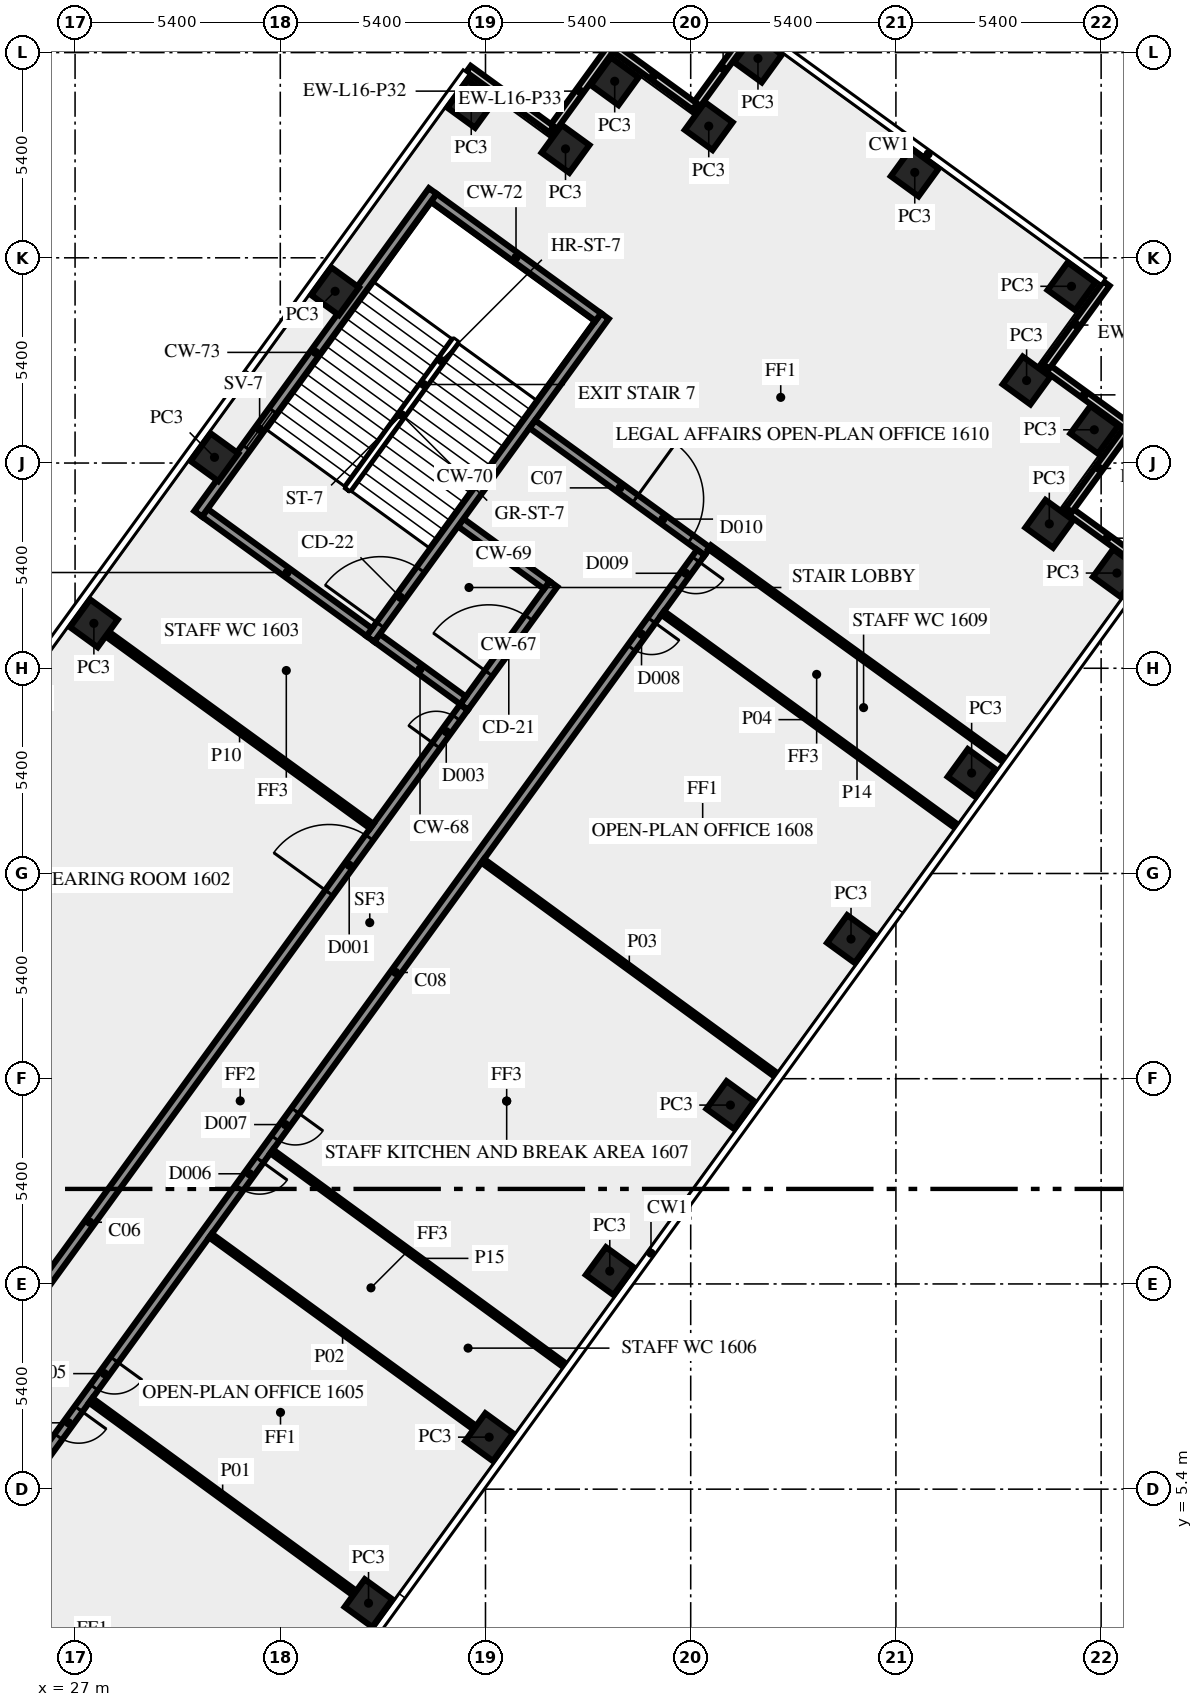
"""IFC4 building model, lengths in metres.
Left out: names, types, materials, properties, quantities, classifications, styles, units other than length and angle.
Written with IfcOpenShell. Run it as: python <this file> out.ifc"""

import sys

from ifc_helpers import new_model, si_unit, direction, frame, frame_2d, origin, origin_2d, place, context, subcontext, project, spatial, rectangle, extrude, element, fill, save


model = new_model("IFC4")
c1 = context("Model", 3, precision=1e-05, world=origin(), true_north=direction((0.0, 1.0)))
c2 = subcontext(c1, "Body", "Model", "MODEL_VIEW")
j1 = project(units=[si_unit("LENGTHUNIT", "METRE"), si_unit("PLANEANGLEUNIT", "RADIAN")], contexts=[c1])
p1 = place(None, origin())
s1 = spatial("IfcSite", under=j1, at=p1, CompositionType="ELEMENT")
p2 = place(p1, origin())
s2 = spatial("IfcBuilding", under=s1, at=p2, CompositionType="ELEMENT")
p3 = place(p2, frame((0.0, 0.0, 71.0)))
s3 = spatial("IfcBuildingStorey", under=s2, at=p3, CompositionType="ELEMENT", Elevation=71.0)
for number, where, z_axis, x_axis in (
    (1, (34.722, 2.4, 0.0), (0.0, 0.0, 1.0), (0.588, 0.809, 0.0)),
    (2, (37.896, 6.769, 0.0), (0.0, 0.0, 1.0), (0.588, 0.809, 0.0)),
    (3, (41.07, 11.137, 0.0), (0.0, 0.0, 1.0), (0.588, 0.809, 0.0)),
    (4, (44.244, 15.506, 0.0), (0.0, 0.0, 1.0), (0.588, 0.809, 0.0)),
    (5, (47.418, 19.875, 0.0), (0.0, 0.0, 1.0), (0.588, 0.809, 0.0)),
    (6, (50.592, 24.243, 0.0), (0.0, 0.0, 1.0), (0.588, 0.809, 0.0)),
    (7, (54.415, 29.505, 0.0), (0.0, 0.0, 1.0), (0.588, 0.809, 0.0)),
    (8, (52.636, 30.8, 0.0), (0.0, 0.0, 1.0), (-0.809, 0.588, 0.0)),
    (9, (53.82, 33.275, 0.0), (0.0, 0.0, 1.0), (-0.809, 0.588, 0.0)),
    (10, (52.039, 34.571, 0.0), (0.0, 0.0, 1.0), (0.588, 0.809, 0.0)),
    (11, (53.22, 37.05, 0.0), (0.0, 0.0, 1.0), (-0.809, 0.588, 0.0)),
    (12, (49.096, 40.047, 0.0), (0.0, 0.0, 1.0), (-0.809, 0.588, 0.0)),
    (13, (44.97, 43.045, 0.0), (0.0, 0.0, 1.0), (-0.809, 0.588, 0.0)),
    (14, (43.675, 41.265, 0.0), (0.0, 0.0, 1.0), (-0.809, 0.588, 0.0)),
    (15, (41.2, 42.445, 0.0), (0.0, 0.0, 1.0), (-0.588, -0.809, 0.0)),
    (16, (39.906, 40.666, 0.0), (0.0, 0.0, 1.0), (-0.588, -0.809, 0.0)),
    (17, (37.425, 41.85, 0.0), (0.0, 0.0, 1.0), (-0.588, -0.809, 0.0)),
    (18, (33.843, 36.919, 0.0), (0.0, 0.0, 1.0), (-0.588, -0.809, 0.0)),
    (19, (30.669, 32.55, 0.0), (0.0, 0.0, 1.0), (-0.588, -0.809, 0.0)),
    (20, (27.495, 28.181, 0.0), (0.0, 0.0, 1.0), (-0.588, -0.809, 0.0)),
):
    element("IfcColumn", number, at=place(p3, frame(where, z_axis=z_axis, x_axis=x_axis)), inside=s3, PredefinedType="COLUMN", context=c2, shape_type="SweptSolid", body=[
        extrude(rectangle(XDim=0.9, YDim=0.9, at=origin_2d()), origin(), (0.0, 0.0, 1.0), 3.65),
    ])
p4 = place(p3, frame((55.247, 29.629, 0.0), z_axis=(0.0, 0.0, 1.0), x_axis=(-0.809033161865, 0.587762999008, 0.0)))
e21 = element("IfcWall", 21, at=p4, inside=s3, PredefinedType="SOLIDWALL", context=c2, shape_type="SweptSolid", body=[
    extrude(rectangle(XDim=2.7, YDim=0.2, at=frame_2d((1.35, 0.0))), origin(), (0.0, 0.0, 1.0), 3.65),
])
p5 = place(p3, frame((53.151, 31.167, 0.0), z_axis=(0.0, 0.0, 1.0), x_axis=(0.587779184282, 0.809021403008, 0.0)))
e22 = element("IfcWall", 22, at=p5, inside=s3, PredefinedType="SOLIDWALL", context=c2, shape_type="SweptSolid", body=[
    extrude(rectangle(XDim=2.7, YDim=0.2, at=frame_2d((1.35, 0.0))), origin(), (0.0, 0.0, 1.0), 3.65),
])
for number, where, z_axis, x_axis in (
    (23, (54.65, 33.4, 0.0), (0.0, 0.0, 1.0), (-0.809, 0.588, 0.0)),
    (24, (52.553, 34.938, 0.0), (0.0, 0.0, 1.0), (0.588, 0.809, 0.0)),
    (25, (44.846, 43.875, 0.0), (0.0, 0.0, 1.0), (-0.588, -0.809, 0.0)),
    (26, (43.308, 41.779, 0.0), (0.0, 0.0, 1.0), (-0.809, 0.588, 0.0)),
):
    element("IfcWall", number, at=place(p3, frame(where, z_axis=z_axis, x_axis=x_axis)), inside=s3, PredefinedType="SOLIDWALL", context=c2, shape_type="SweptSolid", body=[
        extrude(rectangle(XDim=2.7, YDim=0.2, at=frame_2d((1.35, 0.0))), origin(), (0.0, 0.0, 1.0), 3.65),
    ])
p6 = place(p3, frame((41.075, 43.278, 0.0), z_axis=(0.0, 0.0, 1.0), x_axis=(-0.587806000234, -0.809001919707, 0.0)))
e27 = element("IfcWall", 27, at=p6, inside=s3, PredefinedType="SOLIDWALL", context=c2, shape_type="SweptSolid", body=[
    extrude(rectangle(XDim=2.7, YDim=0.2, at=frame_2d((1.35, 0.0))), origin(), (0.0, 0.0, 1.0), 3.65),
])
p7 = place(p3, frame((39.537, 41.181, 0.0), z_axis=(0.0, 0.0, 1.0), x_axis=(-0.809033161865, 0.587762999008, 0.0)))
e28 = element("IfcWall", 28, at=p7, inside=s3, PredefinedType="SOLIDWALL", context=c2, shape_type="SweptSolid", body=[
    extrude(rectangle(XDim=2.7, YDim=0.2, at=frame_2d((1.35, 0.0))), origin(), (0.0, 0.0, 1.0), 3.65),
])
p8 = place(p3, frame((37.238, 25.98, 0.0), z_axis=(0.0, 0.0, 1.0), x_axis=(0.587772420479, 0.809026317077, 0.0)))
e29 = element("IfcWall", 29, at=p8, inside=s3, PredefinedType="SHEAR", context=c2, shape_type="SweptSolid", body=[
    extrude(rectangle(XDim=4.0, YDim=0.25, at=frame_2d((2.0, 0.0))), origin(), (0.0, 0.0, 1.0), 3.65),
])
p9 = place(p8, frame((1.1, 0.0, 0.0)))
e30 = element("IfcOpeningElement", 30, at=p9, cuts=e29, PredefinedType="OPENING", context=c2, shape_type="SweptSolid", body=[
    extrude(rectangle(XDim=1.8, YDim=2.1, at=frame_2d((0.9, 1.05))), frame((0.0, 0.135, 0.0), z_axis=(0.0, -1.0, 0.0), x_axis=(1.0, 0.0, 0.0)), (0.0, 0.0, 1.0), 0.27),
])
for number, where, z_axis, x_axis in (
    (31, (37.21, 26.154, 0.0), (0.0, 0.0, 1.0), (-0.809, 0.588, 0.0)),
    (32, (39.414, 29.188, 0.0), (0.0, 0.0, 1.0), (-0.809, 0.588, 0.0)),
):
    element("IfcWall", number, at=place(p3, frame(where, z_axis=z_axis, x_axis=x_axis)), inside=s3, PredefinedType="SHEAR", context=c2, shape_type="SweptSolid", body=[
        extrude(rectangle(XDim=2.8, YDim=0.25, at=frame_2d((1.4, 0.0))), origin(), (0.0, 0.0, 1.0), 3.65),
    ])
p10 = place(p3, frame((34.77, 27.772, 0.0), z_axis=(0.0, 0.0, 1.0), x_axis=(0.587795589702, 0.809009483706, 0.0)))
e33 = element("IfcWall", 33, at=p10, inside=s3, PredefinedType="SHEAR", context=c2, shape_type="SweptSolid", body=[
    extrude(rectangle(XDim=10.5, YDim=0.25, at=frame_2d((5.25, 0.0))), origin(), (0.0, 0.0, 1.0), 3.65),
])
p11 = place(p10, frame((0.45, 0.0, 0.0)))
e34 = element("IfcOpeningElement", 34, at=p11, cuts=e33, PredefinedType="OPENING", context=c2, shape_type="SweptSolid", body=[
    extrude(rectangle(XDim=1.8, YDim=2.1, at=frame_2d((0.9, 1.05))), frame((0.0, 0.135, 0.0), z_axis=(0.0, -1.0, 0.0), x_axis=(1.0, 0.0, 0.0)), (0.0, 0.0, 1.0), 0.27),
])
p12 = place(p3, frame((34.742, 27.947, 0.0), z_axis=(0.0, 0.0, 1.0), x_axis=(-0.8089984606, 0.587810760999, 0.0)))
e35 = element("IfcWall", 35, at=p12, inside=s3, PredefinedType="SHEAR", context=c2, shape_type="SweptSolid", body=[
    extrude(rectangle(XDim=5.35, YDim=0.25, at=frame_2d((2.675, 0.0))), origin(), (0.0, 0.0, 1.0), 3.65),
])
p13 = place(p3, frame((40.767, 36.24, 0.0), z_axis=(0.0, 0.0, 1.0), x_axis=(-0.809020161303, 0.587780893365, 0.0)))
e36 = element("IfcWall", 36, at=p13, inside=s3, PredefinedType="SHEAR", context=c2, shape_type="SweptSolid", body=[
    extrude(rectangle(XDim=5.35, YDim=0.25, at=frame_2d((2.675, 0.0))), origin(), (0.0, 0.0, 1.0), 3.65),
])
p14 = place(p3, frame((30.24, 31.064, 0.0), z_axis=(0.0, 0.0, 1.0), x_axis=(0.587795589702, 0.809009483706, 0.0)))
e37 = element("IfcWall", 37, at=p14, inside=s3, PredefinedType="SHEAR", context=c2, shape_type="SweptSolid", body=[
    extrude(rectangle(XDim=10.5, YDim=0.25, at=frame_2d((5.25, 0.0))), origin(), (0.0, 0.0, 1.0), 3.65),
])
p15 = place(p14, frame((2.15, 0.0, 1.0)))
e38 = element("IfcOpeningElement", 38, at=p15, cuts=e37, PredefinedType="OPENING", context=c2, shape_type="SweptSolid", body=[
    extrude(rectangle(XDim=1.2, YDim=1.2, at=frame_2d((0.6, 0.6))), frame((0.0, 0.135, 0.0), z_axis=(0.0, -1.0, 0.0), x_axis=(1.0, 0.0, 0.0)), (0.0, 0.0, 1.0), 0.27),
])
p16 = place(p3, frame((17.545, -1.125, 0.0), z_axis=(0.0, 0.0, 1.0), x_axis=(0.587786323093, 0.809016216391, 0.0)))
e39 = element("IfcWall", 39, at=p16, inside=s3, PredefinedType="SOLIDWALL", context=c2, shape_type="SweptSolid", body=[
    extrude(rectangle(XDim=33.493, YDim=0.25, at=frame_2d((16.747, 0.0))), origin(), (0.0, 0.0, 1.0), 3.65),
])
p17 = place(p16, frame((27.458, 0.0, 0.0)))
e40 = element("IfcOpeningElement", 40, at=p17, cuts=e39, PredefinedType="OPENING", context=c2, shape_type="SweptSolid", body=[
    extrude(rectangle(XDim=1.8, YDim=2.1, at=frame_2d((0.9, 1.05))), frame((0.0, 0.135, 0.0), z_axis=(0.0, -1.0, 0.0), x_axis=(1.0, 0.0, 0.0)), (0.0, 0.0, 1.0), 0.27),
])
p18 = place(p16, frame((3.392, 0.0, 0.0)))
e41 = element("IfcOpeningElement", 41, at=p18, cuts=e39, PredefinedType="OPENING", context=c2, shape_type="SweptSolid", body=[
    extrude(rectangle(XDim=1.8, YDim=2.1, at=frame_2d((0.9, 1.05))), frame((0.0, 0.135, 0.0), z_axis=(0.0, -1.0, 0.0), x_axis=(1.0, 0.0, 0.0)), (0.0, 0.0, 1.0), 0.27),
])
p19 = place(p16, frame((32.253, 0.0, 0.0)))
e42 = element("IfcOpeningElement", 42, at=p19, cuts=e39, PredefinedType="OPENING", context=c2, shape_type="SweptSolid", body=[
    extrude(rectangle(XDim=0.9, YDim=2.1, at=frame_2d((0.45, 1.05))), frame((0.0, 0.135, 0.0), z_axis=(0.0, -1.0, 0.0), x_axis=(1.0, 0.0, 0.0)), (0.0, 0.0, 1.0), 0.27),
])
p20 = place(p3, frame((39.034, 33.42, 0.0), z_axis=(0.0, 0.0, 1.0), x_axis=(0.809023325802, -0.587776537732, 0.0)))
e43 = element("IfcWall", 43, at=p20, inside=s3, PredefinedType="SOLIDWALL", context=c2, shape_type="SweptSolid", body=[
    extrude(rectangle(XDim=5.695, YDim=0.25, at=frame_2d((2.848, 0.0))), origin(), (0.0, 0.0, 1.0), 3.65),
])
p21 = place(p20, frame((3.345, 0.0, 0.0)))
e44 = element("IfcOpeningElement", 44, at=p21, cuts=e43, PredefinedType="OPENING", context=c2, shape_type="SweptSolid", body=[
    extrude(rectangle(XDim=1.8, YDim=2.1, at=frame_2d((0.9, 1.05))), frame((0.0, 0.135, 0.0), z_axis=(0.0, -1.0, 0.0), x_axis=(1.0, 0.0, 0.0)), (0.0, 0.0, 1.0), 0.27),
])
p22 = place(p3, frame((43.467, 30.045, 0.0), z_axis=(0.0, 0.0, 1.0), x_axis=(-0.587784726077, -0.809017376692, 0.0)))
e45 = element("IfcWall", 45, at=p22, inside=s3, PredefinedType="SOLIDWALL", context=c2, shape_type="SweptSolid", body=[
    extrude(rectangle(XDim=39.02, YDim=0.25, at=frame_2d((19.51, 0.0))), origin(), (0.0, 0.0, 1.0), 3.65),
])
p23 = place(p22, frame((26.254, 0.0, 0.0)))
e46 = element("IfcOpeningElement", 46, at=p23, cuts=e45, PredefinedType="OPENING", context=c2, shape_type="SweptSolid", body=[
    extrude(rectangle(XDim=0.9, YDim=2.1, at=frame_2d((0.45, 1.05))), frame((0.0, 0.135, 0.0), z_axis=(0.0, -1.0, 0.0), x_axis=(1.0, 0.0, 0.0)), (0.0, 0.0, 1.0), 0.27),
])
p24 = place(p22, frame((2.205, 0.0, 0.0)))
e47 = element("IfcOpeningElement", 47, at=p24, cuts=e45, PredefinedType="OPENING", context=c2, shape_type="SweptSolid", body=[
    extrude(rectangle(XDim=0.9, YDim=2.1, at=frame_2d((0.45, 1.05))), frame((0.0, 0.135, 0.0), z_axis=(0.0, -1.0, 0.0), x_axis=(1.0, 0.0, 0.0)), (0.0, 0.0, 1.0), 0.27),
])
p25 = place(p22, frame((27.855, 0.0, 0.0)))
e48 = element("IfcOpeningElement", 48, at=p25, cuts=e45, PredefinedType="OPENING", context=c2, shape_type="SweptSolid", body=[
    extrude(rectangle(XDim=0.9, YDim=2.1, at=frame_2d((0.45, 1.05))), frame((0.0, 0.135, 0.0), z_axis=(0.0, -1.0, 0.0), x_axis=(1.0, 0.0, 0.0)), (0.0, 0.0, 1.0), 0.27),
])
p26 = place(p22, frame((18.155, 0.0, 0.0)))
e49 = element("IfcOpeningElement", 49, at=p26, cuts=e45, PredefinedType="OPENING", context=c2, shape_type="SweptSolid", body=[
    extrude(rectangle(XDim=0.9, YDim=2.1, at=frame_2d((0.45, 1.05))), frame((0.0, 0.135, 0.0), z_axis=(0.0, -1.0, 0.0), x_axis=(1.0, 0.0, 0.0)), (0.0, 0.0, 1.0), 0.27),
])
p27 = place(p22, frame((19.755, 0.0, 0.0)))
e50 = element("IfcOpeningElement", 50, at=p27, cuts=e45, PredefinedType="OPENING", context=c2, shape_type="SweptSolid", body=[
    extrude(rectangle(XDim=0.9, YDim=2.1, at=frame_2d((0.45, 1.05))), frame((0.0, 0.135, 0.0), z_axis=(0.0, -1.0, 0.0), x_axis=(1.0, 0.0, 0.0)), (0.0, 0.0, 1.0), 0.27),
])
p28 = place(p22, frame((0.224, 0.0, 0.0)))
e51 = element("IfcOpeningElement", 51, at=p28, cuts=e45, PredefinedType="OPENING", context=c2, shape_type="SweptSolid", body=[
    extrude(rectangle(XDim=0.9, YDim=2.1, at=frame_2d((0.45, 1.05))), frame((0.0, 0.135, 0.0), z_axis=(0.0, -1.0, 0.0), x_axis=(1.0, 0.0, 0.0)), (0.0, 0.0, 1.0), 0.27),
])
p29 = place(p3, frame((27.413, 7.735, 0.0), z_axis=(0.0, 0.0, 1.0), x_axis=(0.807664804385, -0.589641894507, 0.0)))
e52 = element("IfcWall", 52, at=p29, inside=s3, PredefinedType="PARTITIONING", context=c2, shape_type="SweptSolid", body=[
    extrude(rectangle(XDim=8.594, YDim=0.15, at=frame_2d((4.297, 0.0))), origin(), (0.0, 0.0, 1.0), 3.65),
])
p30 = place(p3, frame((37.516, 7.02, 0.0), z_axis=(0.0, 0.0, 1.0), x_axis=(-0.809002556908, 0.587805123248, 0.0)))
e53 = element("IfcWall", 53, at=p30, inside=s3, PredefinedType="PARTITIONING", context=c2, shape_type="SweptSolid", body=[
    extrude(rectangle(XDim=8.595, YDim=0.12, at=frame_2d((4.297, 0.0))), origin(), (0.0, 0.0, 1.0), 3.65),
])
p31 = place(p3, frame((37.728, 21.934, 0.0), z_axis=(0.0, 0.0, 1.0), x_axis=(0.807645841498, -0.589667868135, 0.0)))
e54 = element("IfcWall", 54, at=p31, inside=s3, PredefinedType="PARTITIONING", context=c2, shape_type="SweptSolid", body=[
    extrude(rectangle(XDim=9.551, YDim=0.12, at=frame_2d((4.775, 0.0))), origin(), (0.0, 0.0, 1.0), 2.75),
])
p32 = place(p3, frame((50.192, 22.841, 0.0), z_axis=(0.0, 0.0, 1.0), x_axis=(-0.809033337127, 0.587762757767, 0.0)))
e55 = element("IfcWall", 55, at=p32, inside=s3, PredefinedType="PARTITIONING", context=c2, shape_type="SweptSolid", body=[
    extrude(rectangle(XDim=9.551, YDim=0.12, at=frame_2d((4.775, 0.0))), origin(), (0.0, 0.0, 1.0), 2.75),
])
p33 = place(p3, frame((34.806, 22.845, 0.0), z_axis=(0.0, 0.0, 1.0), x_axis=(-0.809030728677, 0.587766348183, 0.0)))
e56 = element("IfcWall", 56, at=p33, inside=s3, PredefinedType="PARTITIONING", context=c2, shape_type="SweptSolid", body=[
    extrude(rectangle(XDim=8.596, YDim=0.15, at=frame_2d((4.298, 0.0))), origin(), (0.0, 0.0, 1.0), 3.65),
])
p34 = place(p3, frame((43.698, 30.185, 0.0), z_axis=(0.0, 0.0, 1.0), x_axis=(0.810419489461, -0.58585002441, 0.0)))
e57 = element("IfcWall", 57, at=p34, inside=s3, PredefinedType="PARTITIONING", context=c2, shape_type="SweptSolid", body=[
    extrude(rectangle(XDim=9.57, YDim=0.12, at=frame_2d((4.785, 0.0))), origin(), (0.0, 0.0, 1.0), 2.75),
])
p35 = place(p3, frame((32.174, 14.288, 0.0), z_axis=(0.0, 0.0, 1.0), x_axis=(0.807664588563, -0.589642190131, 0.0)))
e58 = element("IfcWall", 58, at=p35, inside=s3, PredefinedType="PARTITIONING", context=c2, shape_type="SweptSolid", body=[
    extrude(rectangle(XDim=9.55, YDim=0.12, at=frame_2d((4.775, 0.0))), origin(), (0.0, 0.0, 1.0), 2.75),
])
p36 = place(p9, origin())
e59 = element("IfcDoor", 59, at=p36, inside=s3, OperationType="DOUBLE_DOOR_SINGLE_SWING", PredefinedType="DOOR", context=c2, shape_type="SweptSolid", body=[
    extrude(rectangle(XDim=1.8, YDim=2.1, at=frame_2d((0.9, 1.05))), frame((0.0, 0.025, 0.0), z_axis=(0.0, -1.0, 0.0), x_axis=(1.0, 0.0, 0.0)), (0.0, 0.0, 1.0), 0.05),
])
fill(e30, e59)
p37 = place(p11, origin())
e60 = element("IfcDoor", 60, at=p37, inside=s3, OperationType="DOUBLE_DOOR_SINGLE_SWING", PredefinedType="DOOR", context=c2, shape_type="SweptSolid", body=[
    extrude(rectangle(XDim=1.8, YDim=2.1, at=frame_2d((0.9, 1.05))), frame((0.0, 0.025, 0.0), z_axis=(0.0, -1.0, 0.0), x_axis=(1.0, 0.0, 0.0)), (0.0, 0.0, 1.0), 0.05),
])
fill(e34, e60)
p38 = place(p15, origin())
e61 = element("IfcWindow", 61, at=p38, inside=s3, PartitioningType="SINGLE_PANEL", PredefinedType="WINDOW", context=c2, shape_type="SweptSolid", body=[
    extrude(rectangle(XDim=1.2, YDim=1.2, at=frame_2d((0.6, 0.6))), frame((0.0, 0.03, 0.0), z_axis=(0.0, -1.0, 0.0), x_axis=(1.0, 0.0, 0.0)), (0.0, 0.0, 1.0), 0.06),
])
fill(e38, e61)
p39 = place(p23, origin())
e62 = element("IfcDoor", 62, at=p39, inside=s3, OperationType="SINGLE_SWING_RIGHT", PredefinedType="DOOR", context=c2, shape_type="SweptSolid", body=[
    extrude(rectangle(XDim=0.9, YDim=2.1, at=frame_2d((0.45, 1.05))), frame((0.0, 0.025, 0.0), z_axis=(0.0, -1.0, 0.0), x_axis=(1.0, 0.0, 0.0)), (0.0, 0.0, 1.0), 0.05),
])
fill(e46, e62)
p40 = place(p24, origin())
e63 = element("IfcDoor", 63, at=p40, inside=s3, OperationType="SINGLE_SWING_LEFT", PredefinedType="DOOR", context=c2, shape_type="SweptSolid", body=[
    extrude(rectangle(XDim=0.9, YDim=2.1, at=frame_2d((0.45, 1.05))), frame((0.0, 0.025, 0.0), z_axis=(0.0, -1.0, 0.0), x_axis=(1.0, 0.0, 0.0)), (0.0, 0.0, 1.0), 0.05),
])
fill(e47, e63)
p41 = place(p17, origin())
e64 = element("IfcDoor", 64, at=p41, inside=s3, OperationType="DOUBLE_DOOR_SINGLE_SWING", PredefinedType="DOOR", context=c2, shape_type="SweptSolid", body=[
    extrude(rectangle(XDim=1.8, YDim=2.1, at=frame_2d((0.9, 1.05))), frame((0.0, 0.025, 0.0), z_axis=(0.0, -1.0, 0.0), x_axis=(1.0, 0.0, 0.0)), (0.0, 0.0, 1.0), 0.05),
])
fill(e40, e64)
p42 = place(p25, origin())
e65 = element("IfcDoor", 65, at=p42, inside=s3, OperationType="SINGLE_SWING_LEFT", PredefinedType="DOOR", context=c2, shape_type="SweptSolid", body=[
    extrude(rectangle(XDim=0.9, YDim=2.1, at=frame_2d((0.45, 1.05))), frame((0.0, 0.025, 0.0), z_axis=(0.0, -1.0, 0.0), x_axis=(1.0, 0.0, 0.0)), (0.0, 0.0, 1.0), 0.05),
])
fill(e48, e65)
p43 = place(p21, origin())
e66 = element("IfcDoor", 66, at=p43, inside=s3, OperationType="DOUBLE_DOOR_SINGLE_SWING", PredefinedType="DOOR", context=c2, shape_type="SweptSolid", body=[
    extrude(rectangle(XDim=1.8, YDim=2.1, at=frame_2d((0.9, 1.05))), frame((0.0, 0.025, 0.0), z_axis=(0.0, -1.0, 0.0), x_axis=(1.0, 0.0, 0.0)), (0.0, 0.0, 1.0), 0.05),
])
fill(e44, e66)
p44 = place(p26, origin())
e67 = element("IfcDoor", 67, at=p44, inside=s3, OperationType="SINGLE_SWING_RIGHT", PredefinedType="DOOR", context=c2, shape_type="SweptSolid", body=[
    extrude(rectangle(XDim=0.9, YDim=2.1, at=frame_2d((0.45, 1.05))), frame((0.0, 0.025, 0.0), z_axis=(0.0, -1.0, 0.0), x_axis=(1.0, 0.0, 0.0)), (0.0, 0.0, 1.0), 0.05),
])
fill(e49, e67)
p45 = place(p19, origin())
e68 = element("IfcDoor", 68, at=p45, inside=s3, OperationType="SINGLE_SWING_RIGHT", PredefinedType="DOOR", context=c2, shape_type="SweptSolid", body=[
    extrude(rectangle(XDim=0.9, YDim=2.1, at=frame_2d((0.45, 1.05))), frame((0.0, 0.025, 0.0), z_axis=(0.0, -1.0, 0.0), x_axis=(1.0, 0.0, 0.0)), (0.0, 0.0, 1.0), 0.05),
])
fill(e42, e68)
p46 = place(p27, origin())
e69 = element("IfcDoor", 69, at=p46, inside=s3, OperationType="SINGLE_SWING_LEFT", PredefinedType="DOOR", context=c2, shape_type="SweptSolid", body=[
    extrude(rectangle(XDim=0.9, YDim=2.1, at=frame_2d((0.45, 1.05))), frame((0.0, 0.025, 0.0), z_axis=(0.0, -1.0, 0.0), x_axis=(1.0, 0.0, 0.0)), (0.0, 0.0, 1.0), 0.05),
])
fill(e50, e69)
p47 = place(p28, origin())
e70 = element("IfcDoor", 70, at=p47, inside=s3, OperationType="SINGLE_SWING_LEFT", PredefinedType="DOOR", context=c2, shape_type="SweptSolid", body=[
    extrude(rectangle(XDim=0.9, YDim=2.1, at=frame_2d((0.45, 1.05))), frame((0.0, 0.025, 0.0), z_axis=(0.0, -1.0, 0.0), x_axis=(1.0, 0.0, 0.0)), (0.0, 0.0, 1.0), 0.05),
])
fill(e51, e70)
save(model, sys.argv[1])
